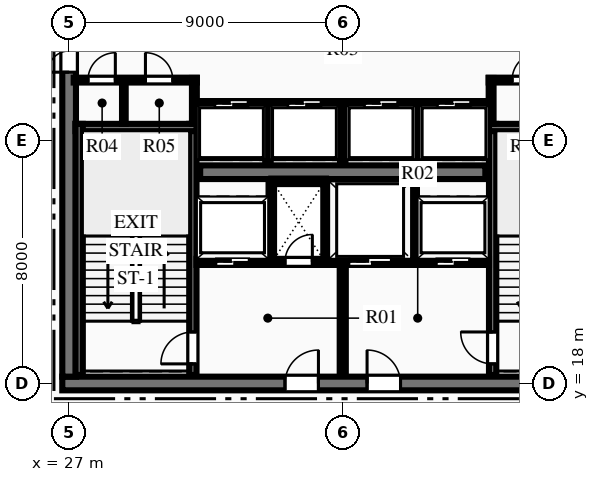
"""IFC4 building model, lengths in metres.
Left out: names, types, materials, properties, quantities, classifications, styles, units other than length and angle.
Written with IfcOpenShell. Run it as: python <this file> out.ifc"""

import sys

from ifc_helpers import new_model, si_unit, direction, frame, frame_2d, origin, place, context, subcontext, project, spatial, rectangle, extrude, element, fill, save


model = new_model("IFC4")
c1 = context("Model", 3, precision=1e-05, world=origin(), true_north=direction((0.0, 1.0)))
c2 = subcontext(c1, "Body", "Model", "MODEL_VIEW")
j1 = project(units=[si_unit("LENGTHUNIT", "METRE"), si_unit("PLANEANGLEUNIT", "RADIAN")], contexts=[c1])
p1 = place(None, origin())
s1 = spatial("IfcSite", under=j1, at=p1, CompositionType="ELEMENT")
p2 = place(p1, origin())
s2 = spatial("IfcBuilding", under=s1, at=p2, CompositionType="ELEMENT")
p3 = place(p2, frame((0.0, 0.0, 317.7)))
s3 = spatial("IfcBuildingStorey", under=s2, at=p3, CompositionType="ELEMENT", Elevation=317.7)
p4 = place(p3, frame((26.775, 18.0, 0.0), z_axis=(0.0, 0.0, 1.0), x_axis=(1.0, 0.0, 0.0)))
e1 = element("IfcWall", 1, at=p4, inside=s3, PredefinedType="SHEAR", context=c2, shape_type="SweptSolid", body=[
    extrude(rectangle(XDim=18.45, YDim=0.45, at=frame_2d((9.225, 0.0))), origin(), (0.0, 0.0, 1.0), 3.75),
])
p5 = place(p4, frame((7.325, 0.0, 0.0)))
e2 = element("IfcOpeningElement", 2, at=p5, cuts=e1, PredefinedType="OPENING", context=c2, shape_type="SweptSolid", body=[
    extrude(rectangle(XDim=1.1, YDim=2.15, at=frame_2d((0.55, 1.075))), frame((0.0, 0.235, 0.0), z_axis=(0.0, -1.0, 0.0), x_axis=(1.0, 0.0, 0.0)), (0.0, 0.0, 1.0), 0.47),
])
p6 = place(p4, frame((10.025, 0.0, 0.0)))
e3 = element("IfcOpeningElement", 3, at=p6, cuts=e1, PredefinedType="OPENING", context=c2, shape_type="SweptSolid", body=[
    extrude(rectangle(XDim=1.1, YDim=2.15, at=frame_2d((0.55, 1.075))), frame((0.0, 0.235, 0.0), z_axis=(0.0, -1.0, 0.0), x_axis=(1.0, 0.0, 0.0)), (0.0, 0.0, 1.0), 0.47),
])
p7 = place(p3, frame((27.0, 18.225, 0.0), z_axis=(0.0, 0.0, 1.0), x_axis=(0.0, 1.0, 0.0)))
e4 = element("IfcWall", 4, at=p7, inside=s3, PredefinedType="SHEAR", context=c2, shape_type="SweptSolid", body=[
    extrude(rectangle(XDim=15.55, YDim=0.45, at=frame_2d((7.775, 0.0))), origin(), (0.0, 0.0, 1.0), 3.75),
])
p8 = place(p7, frame((10.015, 0.0, 0.0)))
e5 = element("IfcOpeningElement", 5, at=p8, cuts=e4, PredefinedType="OPENING", context=c2, shape_type="SweptSolid", body=[
    extrude(rectangle(XDim=1.4, YDim=2.2, at=frame_2d((0.7, 1.1))), frame((0.0, 0.235, 0.0), z_axis=(0.0, -1.0, 0.0), x_axis=(1.0, 0.0, 0.0)), (0.0, 0.0, 1.0), 0.47),
])
p9 = place(p3, frame((31.31, 24.95, 0.0), z_axis=(0.0, 0.0, 1.0), x_axis=(1.0, 0.0, 0.0)))
e6 = element("IfcWall", 6, at=p9, inside=s3, PredefinedType="SHEAR", context=c2, shape_type="SweptSolid", body=[
    extrude(rectangle(XDim=9.38, YDim=0.45, at=frame_2d((4.69, 0.0))), origin(), (0.0, 0.0, 1.0), 3.75),
])
p10 = place(p3, frame((31.07, 18.28, 0.0), z_axis=(0.0, 0.0, 1.0), x_axis=(0.0, 1.0, 0.0)))
e7 = element("IfcWall", 7, at=p10, inside=s3, PredefinedType="SHEAR", context=c2, shape_type="SweptSolid", body=[
    extrude(rectangle(XDim=8.26, YDim=0.24, at=frame_2d((4.13, 0.0))), origin(), (0.0, 0.0, 1.0), 3.75),
])
p11 = place(p10, frame((0.365, 0.0, 0.0)))
e8 = element("IfcOpeningElement", 8, at=p11, cuts=e7, PredefinedType="OPENING", context=c2, shape_type="SweptSolid", body=[
    extrude(rectangle(XDim=1.05, YDim=2.15, at=frame_2d((0.525, 1.075))), frame((0.0, 0.13, 0.0), z_axis=(0.0, -1.0, 0.0), x_axis=(1.0, 0.0, 0.0)), (0.0, 0.0, 1.0), 0.26),
])
p12 = place(p3, frame((27.21, 26.42, 0.0), z_axis=(0.0, 0.0, 1.0), x_axis=(1.0, 0.0, 0.0)))
e9 = element("IfcWall", 9, at=p12, inside=s3, PredefinedType="SHEAR", context=c2, shape_type="SweptSolid", body=[
    extrude(rectangle(XDim=3.98, YDim=0.24, at=frame_2d((1.99, 0.0))), origin(), (0.0, 0.0, 1.0), 3.75),
])
p13 = place(p3, frame((27.33, 18.28, 0.0), z_axis=(0.0, 0.0, 1.0), x_axis=(0.0, 1.0, 0.0)))
e10 = element("IfcWall", 10, at=p13, inside=s3, PredefinedType="SHEAR", context=c2, shape_type="SweptSolid", body=[
    extrude(rectangle(XDim=8.26, YDim=0.24, at=frame_2d((4.13, 0.0))), origin(), (0.0, 0.0, 1.0), 3.75),
])
p14 = place(p3, frame((40.93, 18.28, 0.0), z_axis=(0.0, 0.0, 1.0), x_axis=(0.0, 1.0, 0.0)))
e11 = element("IfcWall", 11, at=p14, inside=s3, PredefinedType="SHEAR", context=c2, shape_type="SweptSolid", body=[
    extrude(rectangle(XDim=8.26, YDim=0.24, at=frame_2d((4.13, 0.0))), origin(), (0.0, 0.0, 1.0), 3.75),
])
p15 = place(p14, frame((0.365, 0.0, 0.0)))
e12 = element("IfcOpeningElement", 12, at=p15, cuts=e11, PredefinedType="OPENING", context=c2, shape_type="SweptSolid", body=[
    extrude(rectangle(XDim=1.05, YDim=2.15, at=frame_2d((0.525, 1.075))), frame((0.0, 0.13, 0.0), z_axis=(0.0, -1.0, 0.0), x_axis=(1.0, 0.0, 0.0)), (0.0, 0.0, 1.0), 0.26),
])
p16 = place(p3, frame((40.81, 26.42, 0.0), z_axis=(0.0, 0.0, 1.0), x_axis=(1.0, 0.0, 0.0)))
e13 = element("IfcWall", 13, at=p16, inside=s3, PredefinedType="SHEAR", context=c2, shape_type="SweptSolid", body=[
    extrude(rectangle(XDim=3.98, YDim=0.24, at=frame_2d((1.99, 0.0))), origin(), (0.0, 0.0, 1.0), 3.75),
])
p17 = place(p3, frame((36.0, 18.28, 0.0), z_axis=(0.0, 0.0, 1.0), x_axis=(0.0, 1.0, 0.0)))
e14 = element("IfcWall", 14, at=p17, inside=s3, PredefinedType="PARTITIONING", context=c2, shape_type="SweptSolid", body=[
    extrude(rectangle(XDim=3.77, YDim=0.2, at=frame_2d((1.885, 0.0))), origin(), (0.0, 0.0, 1.0), 3.49),
])
p18 = place(p3, frame((31.19, 22.0, 0.0), z_axis=(0.0, 0.0, 1.0), x_axis=(1.0, 0.0, 0.0)))
e15 = element("IfcWall", 15, at=p18, inside=s3, PredefinedType="PARTITIONING", context=c2, shape_type="SweptSolid", body=[
    extrude(rectangle(XDim=4.69, YDim=0.2, at=frame_2d((2.345, 0.0))), origin(), (0.0, 0.0, 1.0), 3.49),
])
p19 = place(p18, frame((2.91, 0.0, 0.0)))
e16 = element("IfcOpeningElement", 16, at=p19, cuts=e15, PredefinedType="OPENING", context=c2, shape_type="SweptSolid", body=[
    extrude(rectangle(XDim=0.9, YDim=2.15, at=frame_2d((0.45, 1.075))), frame((0.0, 0.11, 0.0), z_axis=(0.0, -1.0, 0.0), x_axis=(1.0, 0.0, 0.0)), (0.0, 0.0, 1.0), 0.22),
])
p20 = place(p18, frame((0.635, 0.0, 0.0)))
e17 = element("IfcOpeningElement", 17, at=p20, cuts=e15, PredefinedType="OPENING", context=c2, shape_type="SweptSolid", body=[
    extrude(rectangle(XDim=1.1, YDim=2.15, at=frame_2d((0.55, 1.075))), frame((0.0, 0.11, 0.0), z_axis=(0.0, -1.0, 0.0), x_axis=(1.0, 0.0, 0.0)), (0.0, 0.0, 1.0), 0.22),
])
p21 = place(p3, frame((36.12, 22.0, 0.0), z_axis=(0.0, 0.0, 1.0), x_axis=(1.0, 0.0, 0.0)))
e18 = element("IfcWall", 18, at=p21, inside=s3, PredefinedType="PARTITIONING", context=c2, shape_type="SweptSolid", body=[
    extrude(rectangle(XDim=4.69, YDim=0.2, at=frame_2d((2.345, 0.0))), origin(), (0.0, 0.0, 1.0), 3.49),
])
p22 = place(p21, frame((2.955, 0.0, 0.0)))
e19 = element("IfcOpeningElement", 19, at=p22, cuts=e18, PredefinedType="OPENING", context=c2, shape_type="SweptSolid", body=[
    extrude(rectangle(XDim=1.1, YDim=2.15, at=frame_2d((0.55, 1.075))), frame((0.0, 0.11, 0.0), z_axis=(0.0, -1.0, 0.0), x_axis=(1.0, 0.0, 0.0)), (0.0, 0.0, 1.0), 0.22),
])
p23 = place(p21, frame((0.08, 0.0, 0.0)))
e20 = element("IfcOpeningElement", 20, at=p23, cuts=e18, PredefinedType="OPENING", context=c2, shape_type="SweptSolid", body=[
    extrude(rectangle(XDim=1.4, YDim=2.2, at=frame_2d((0.7, 1.1))), frame((0.0, 0.11, 0.0), z_axis=(0.0, -1.0, 0.0), x_axis=(1.0, 0.0, 0.0)), (0.0, 0.0, 1.0), 0.22),
])
for number, where, z_axis, x_axis in (
    (21, (33.65, 22.05, 0.0), (0.0, 0.0, 1.0), (0.0, 1.0, 0.0)),
    (22, (35.45, 22.05, 0.0), (0.0, 0.0, 1.0), (0.0, 1.0, 0.0)),
):
    element("IfcWall", number, at=place(p3, frame(where, z_axis=z_axis, x_axis=x_axis)), inside=s3, PredefinedType="PARTITIONING", context=c2, shape_type="SweptSolid", body=[
        extrude(rectangle(XDim=2.6, YDim=0.18, at=frame_2d((1.3, 0.0))), origin(), (0.0, 0.0, 1.0), 3.49),
    ])
p24 = place(p3, frame((33.65, 24.65, 0.0), z_axis=(0.0, 0.0, 1.0), x_axis=(1.0, 0.0, 0.0)))
e23 = element("IfcWall", 23, at=p24, inside=s3, PredefinedType="PARTITIONING", context=c2, shape_type="SweptSolid", body=[
    extrude(rectangle(XDim=1.8, YDim=0.18, at=frame_2d((0.9, 0.0))), origin(), (0.0, 0.0, 1.0), 3.49),
])
p25 = place(p3, frame((38.35, 22.05, 0.0), z_axis=(0.0, 0.0, 1.0), x_axis=(0.0, 1.0, 0.0)))
e24 = element("IfcWall", 24, at=p25, inside=s3, PredefinedType="PARTITIONING", context=c2, shape_type="SweptSolid", body=[
    extrude(rectangle(XDim=2.6, YDim=0.18, at=frame_2d((1.3, 0.0))), origin(), (0.0, 0.0, 1.0), 3.49),
])
p26 = place(p3, frame((27.15, 27.98, 0.0), z_axis=(0.0, 0.0, 1.0), x_axis=(1.0, 0.0, 0.0)))
e25 = element("IfcWall", 25, at=p26, inside=s3, PredefinedType="PARTITIONING", context=c2, shape_type="SweptSolid", body=[
    extrude(rectangle(XDim=4.05, YDim=0.16, at=frame_2d((2.025, 0.0))), origin(), (0.0, 0.0, 1.0), 3.49),
])
p27 = place(p26, frame((0.47, 0.0, 0.0)))
e26 = element("IfcOpeningElement", 26, at=p27, cuts=e25, PredefinedType="OPENING", context=c2, shape_type="SweptSolid", body=[
    extrude(rectangle(XDim=0.9, YDim=2.15, at=frame_2d((0.45, 1.075))), frame((0.0, 0.09, 0.0), z_axis=(0.0, -1.0, 0.0), x_axis=(1.0, 0.0, 0.0)), (0.0, 0.0, 1.0), 0.18),
])
p28 = place(p26, frame((2.36, 0.0, 0.0)))
e27 = element("IfcOpeningElement", 27, at=p28, cuts=e25, PredefinedType="OPENING", context=c2, shape_type="SweptSolid", body=[
    extrude(rectangle(XDim=0.9, YDim=2.15, at=frame_2d((0.45, 1.075))), frame((0.0, 0.09, 0.0), z_axis=(0.0, -1.0, 0.0), x_axis=(1.0, 0.0, 0.0)), (0.0, 0.0, 1.0), 0.18),
])
p29 = place(p3, frame((31.12, 26.54, 0.0), z_axis=(0.0, 0.0, 1.0), x_axis=(0.0, 1.0, 0.0)))
e28 = element("IfcWall", 28, at=p29, inside=s3, PredefinedType="PARTITIONING", context=c2, shape_type="SweptSolid", body=[
    extrude(rectangle(XDim=1.51, YDim=0.16, at=frame_2d((0.755, 0.0))), origin(), (0.0, 0.0, 1.0), 3.49),
])
p30 = place(p3, frame((40.8, 27.98, 0.0), z_axis=(0.0, 0.0, 1.0), x_axis=(1.0, 0.0, 0.0)))
e29 = element("IfcWall", 29, at=p30, inside=s3, PredefinedType="PARTITIONING", context=c2, shape_type="SweptSolid", body=[
    extrude(rectangle(XDim=4.05, YDim=0.16, at=frame_2d((2.025, 0.0))), origin(), (0.0, 0.0, 1.0), 3.49),
])
p31 = place(p30, frame((0.77, 0.0, 0.0)))
e30 = element("IfcOpeningElement", 30, at=p31, cuts=e29, PredefinedType="OPENING", context=c2, shape_type="SweptSolid", body=[
    extrude(rectangle(XDim=0.9, YDim=2.15, at=frame_2d((0.45, 1.075))), frame((0.0, 0.09, 0.0), z_axis=(0.0, -1.0, 0.0), x_axis=(1.0, 0.0, 0.0)), (0.0, 0.0, 1.0), 0.18),
])
p32 = place(p30, frame((2.68, 0.0, 0.0)))
e31 = element("IfcOpeningElement", 31, at=p32, cuts=e29, PredefinedType="OPENING", context=c2, shape_type="SweptSolid", body=[
    extrude(rectangle(XDim=0.9, YDim=2.15, at=frame_2d((0.45, 1.075))), frame((0.0, 0.09, 0.0), z_axis=(0.0, -1.0, 0.0), x_axis=(1.0, 0.0, 0.0)), (0.0, 0.0, 1.0), 0.18),
])
p33 = place(p3, frame((40.88, 26.54, 0.0), z_axis=(0.0, 0.0, 1.0), x_axis=(0.0, 1.0, 0.0)))
e32 = element("IfcWall", 32, at=p33, inside=s3, PredefinedType="PARTITIONING", context=c2, shape_type="SweptSolid", body=[
    extrude(rectangle(XDim=1.51, YDim=0.16, at=frame_2d((0.755, 0.0))), origin(), (0.0, 0.0, 1.0), 3.49),
])
p34 = place(p3, frame((28.8, 26.54, 0.0), z_axis=(0.0, 0.0, 1.0), x_axis=(0.0, 1.0, 0.0)))
e33 = element("IfcWall", 33, at=p34, inside=s3, PredefinedType="PARTITIONING", context=c2, shape_type="SweptSolid", body=[
    extrude(rectangle(XDim=1.44, YDim=0.12, at=frame_2d((0.72, 0.0))), origin(), (0.0, 0.0, 1.0), 3.49),
])
p35 = place(p3, frame((31.2, 27.2, 0.0), z_axis=(0.0, 0.0, 1.0), x_axis=(1.0, 0.0, 0.0)))
e34 = element("IfcWall", 34, at=p35, inside=s3, PredefinedType="PARTITIONING", context=c2, shape_type="SweptSolid", body=[
    extrude(rectangle(XDim=9.6, YDim=0.18, at=frame_2d((4.8, 0.0))), origin(), (0.0, 0.0, 1.0), 3.49),
])
p36 = place(p35, frame((0.59, 0.0, 0.0)))
e35 = element("IfcOpeningElement", 35, at=p36, cuts=e34, PredefinedType="OPENING", context=c2, shape_type="SweptSolid", body=[
    extrude(rectangle(XDim=1.1, YDim=2.15, at=frame_2d((0.55, 1.075))), frame((0.0, 0.1, 0.0), z_axis=(0.0, -1.0, 0.0), x_axis=(1.0, 0.0, 0.0)), (0.0, 0.0, 1.0), 0.2),
])
p37 = place(p35, frame((2.99, 0.0, 0.0)))
e36 = element("IfcOpeningElement", 36, at=p37, cuts=e34, PredefinedType="OPENING", context=c2, shape_type="SweptSolid", body=[
    extrude(rectangle(XDim=1.1, YDim=2.15, at=frame_2d((0.55, 1.075))), frame((0.0, 0.1, 0.0), z_axis=(0.0, -1.0, 0.0), x_axis=(1.0, 0.0, 0.0)), (0.0, 0.0, 1.0), 0.2),
])
p38 = place(p35, frame((5.51, 0.0, 0.0)))
e37 = element("IfcOpeningElement", 37, at=p38, cuts=e34, PredefinedType="OPENING", context=c2, shape_type="SweptSolid", body=[
    extrude(rectangle(XDim=1.1, YDim=2.15, at=frame_2d((0.55, 1.075))), frame((0.0, 0.1, 0.0), z_axis=(0.0, -1.0, 0.0), x_axis=(1.0, 0.0, 0.0)), (0.0, 0.0, 1.0), 0.2),
])
p39 = place(p35, frame((7.91, 0.0, 0.0)))
e38 = element("IfcOpeningElement", 38, at=p39, cuts=e34, PredefinedType="OPENING", context=c2, shape_type="SweptSolid", body=[
    extrude(rectangle(XDim=1.1, YDim=2.15, at=frame_2d((0.55, 1.075))), frame((0.0, 0.1, 0.0), z_axis=(0.0, -1.0, 0.0), x_axis=(1.0, 0.0, 0.0)), (0.0, 0.0, 1.0), 0.2),
])
for number, where, z_axis, x_axis in (
    (39, (33.54, 25.3, 0.0), (0.0, 0.0, 1.0), (0.0, 1.0, 0.0)),
    (40, (36.0, 25.3, 0.0), (0.0, 0.0, 1.0), (0.0, 1.0, 0.0)),
    (41, (38.46, 25.3, 0.0), (0.0, 0.0, 1.0), (0.0, 1.0, 0.0)),
):
    element("IfcWall", number, at=place(p3, frame(where, z_axis=z_axis, x_axis=x_axis)), inside=s3, PredefinedType="PARTITIONING", context=c2, shape_type="SweptSolid", body=[
        extrude(rectangle(XDim=1.9, YDim=0.18, at=frame_2d((0.95, 0.0))), origin(), (0.0, 0.0, 1.0), 3.49),
    ])
p40 = place(p27, origin())
e42 = element("IfcDoor", 42, at=p40, inside=s3, OperationType="SINGLE_SWING_RIGHT", PredefinedType="DOOR", context=c2, shape_type="SweptSolid", body=[
    extrude(rectangle(XDim=0.9, YDim=2.15, at=frame_2d((0.45, 1.075))), frame((0.0, 0.025, 0.0), z_axis=(0.0, -1.0, 0.0), x_axis=(1.0, 0.0, 0.0)), (0.0, 0.0, 1.0), 0.05),
])
fill(e26, e42)
p41 = place(p28, origin())
e43 = element("IfcDoor", 43, at=p41, inside=s3, OperationType="SINGLE_SWING_LEFT", PredefinedType="DOOR", context=c2, shape_type="SweptSolid", body=[
    extrude(rectangle(XDim=0.9, YDim=2.15, at=frame_2d((0.45, 1.075))), frame((0.0, 0.025, 0.0), z_axis=(0.0, -1.0, 0.0), x_axis=(1.0, 0.0, 0.0)), (0.0, 0.0, 1.0), 0.05),
])
fill(e27, e43)
p42 = place(p31, origin())
e44 = element("IfcDoor", 44, at=p42, inside=s3, OperationType="SINGLE_SWING_RIGHT", PredefinedType="DOOR", context=c2, shape_type="SweptSolid", body=[
    extrude(rectangle(XDim=0.9, YDim=2.15, at=frame_2d((0.45, 1.075))), frame((0.0, 0.025, 0.0), z_axis=(0.0, -1.0, 0.0), x_axis=(1.0, 0.0, 0.0)), (0.0, 0.0, 1.0), 0.05),
])
fill(e30, e44)
p43 = place(p11, origin())
e45 = element("IfcDoor", 45, at=p43, inside=s3, OperationType="SINGLE_SWING_LEFT", PredefinedType="DOOR", context=c2, shape_type="SweptSolid", body=[
    extrude(rectangle(XDim=1.05, YDim=2.15, at=frame_2d((0.525, 1.075))), frame((0.0, 0.025, 0.0), z_axis=(0.0, -1.0, 0.0), x_axis=(1.0, 0.0, 0.0)), (0.0, 0.0, 1.0), 0.05),
])
fill(e8, e45)
p44 = place(p15, origin())
e46 = element("IfcDoor", 46, at=p44, inside=s3, OperationType="SINGLE_SWING_RIGHT", PredefinedType="DOOR", context=c2, shape_type="SweptSolid", body=[
    extrude(rectangle(XDim=1.05, YDim=2.15, at=frame_2d((0.525, 1.075))), frame((0.0, 0.025, 0.0), z_axis=(0.0, -1.0, 0.0), x_axis=(1.0, 0.0, 0.0)), (0.0, 0.0, 1.0), 0.05),
])
fill(e12, e46)
p45 = place(p5, origin())
e47 = element("IfcDoor", 47, at=p45, inside=s3, OperationType="SINGLE_SWING_RIGHT", PredefinedType="DOOR", context=c2, shape_type="SweptSolid", body=[
    extrude(rectangle(XDim=1.1, YDim=2.15, at=frame_2d((0.55, 1.075))), frame((0.0, 0.025, 0.0), z_axis=(0.0, -1.0, 0.0), x_axis=(1.0, 0.0, 0.0)), (0.0, 0.0, 1.0), 0.05),
])
fill(e2, e47)
p46 = place(p6, origin())
e48 = element("IfcDoor", 48, at=p46, inside=s3, OperationType="SINGLE_SWING_LEFT", PredefinedType="DOOR", context=c2, shape_type="SweptSolid", body=[
    extrude(rectangle(XDim=1.1, YDim=2.15, at=frame_2d((0.55, 1.075))), frame((0.0, 0.025, 0.0), z_axis=(0.0, -1.0, 0.0), x_axis=(1.0, 0.0, 0.0)), (0.0, 0.0, 1.0), 0.05),
])
fill(e3, e48)
p47 = place(p19, origin())
e49 = element("IfcDoor", 49, at=p47, inside=s3, OperationType="SINGLE_SWING_RIGHT", PredefinedType="DOOR", context=c2, shape_type="SweptSolid", body=[
    extrude(rectangle(XDim=0.9, YDim=2.15, at=frame_2d((0.45, 1.075))), frame((0.0, 0.025, 0.0), z_axis=(0.0, -1.0, 0.0), x_axis=(1.0, 0.0, 0.0)), (0.0, 0.0, 1.0), 0.05),
])
fill(e16, e49)
p48 = place(p8, origin())
e50 = element("IfcDoor", 50, at=p48, inside=s3, OperationType="DOUBLE_DOOR_SINGLE_SWING", PredefinedType="DOOR", context=c2, shape_type="SweptSolid", body=[
    extrude(rectangle(XDim=1.4, YDim=2.2, at=frame_2d((0.7, 1.1))), frame((0.0, 0.025, 0.0), z_axis=(0.0, -1.0, 0.0), x_axis=(1.0, 0.0, 0.0)), (0.0, 0.0, 1.0), 0.05),
])
fill(e5, e50)
p49 = place(p36, origin())
e51 = element("IfcDoor", 51, at=p49, inside=s3, OperationType="SLIDING_TO_LEFT", PredefinedType="DOOR", context=c2, shape_type="SweptSolid", body=[
    extrude(rectangle(XDim=1.1, YDim=2.15, at=frame_2d((0.55, 1.075))), frame((0.0, 0.025, 0.0), z_axis=(0.0, -1.0, 0.0), x_axis=(1.0, 0.0, 0.0)), (0.0, 0.0, 1.0), 0.05),
])
fill(e35, e51)
p50 = place(p37, origin())
e52 = element("IfcDoor", 52, at=p50, inside=s3, OperationType="SLIDING_TO_LEFT", PredefinedType="DOOR", context=c2, shape_type="SweptSolid", body=[
    extrude(rectangle(XDim=1.1, YDim=2.15, at=frame_2d((0.55, 1.075))), frame((0.0, 0.025, 0.0), z_axis=(0.0, -1.0, 0.0), x_axis=(1.0, 0.0, 0.0)), (0.0, 0.0, 1.0), 0.05),
])
fill(e36, e52)
p51 = place(p38, origin())
e53 = element("IfcDoor", 53, at=p51, inside=s3, OperationType="SLIDING_TO_LEFT", PredefinedType="DOOR", context=c2, shape_type="SweptSolid", body=[
    extrude(rectangle(XDim=1.1, YDim=2.15, at=frame_2d((0.55, 1.075))), frame((0.0, 0.025, 0.0), z_axis=(0.0, -1.0, 0.0), x_axis=(1.0, 0.0, 0.0)), (0.0, 0.0, 1.0), 0.05),
])
fill(e37, e53)
p52 = place(p39, origin())
e54 = element("IfcDoor", 54, at=p52, inside=s3, OperationType="SLIDING_TO_LEFT", PredefinedType="DOOR", context=c2, shape_type="SweptSolid", body=[
    extrude(rectangle(XDim=1.1, YDim=2.15, at=frame_2d((0.55, 1.075))), frame((0.0, 0.025, 0.0), z_axis=(0.0, -1.0, 0.0), x_axis=(1.0, 0.0, 0.0)), (0.0, 0.0, 1.0), 0.05),
])
fill(e38, e54)
p53 = place(p20, origin())
e55 = element("IfcDoor", 55, at=p53, inside=s3, OperationType="SLIDING_TO_LEFT", PredefinedType="DOOR", context=c2, shape_type="SweptSolid", body=[
    extrude(rectangle(XDim=1.1, YDim=2.15, at=frame_2d((0.55, 1.075))), frame((0.0, 0.025, 0.0), z_axis=(0.0, -1.0, 0.0), x_axis=(1.0, 0.0, 0.0)), (0.0, 0.0, 1.0), 0.05),
])
fill(e17, e55)
p54 = place(p22, origin())
e56 = element("IfcDoor", 56, at=p54, inside=s3, OperationType="SLIDING_TO_LEFT", PredefinedType="DOOR", context=c2, shape_type="SweptSolid", body=[
    extrude(rectangle(XDim=1.1, YDim=2.15, at=frame_2d((0.55, 1.075))), frame((0.0, 0.025, 0.0), z_axis=(0.0, -1.0, 0.0), x_axis=(1.0, 0.0, 0.0)), (0.0, 0.0, 1.0), 0.05),
])
fill(e19, e56)
p55 = place(p23, origin())
e57 = element("IfcDoor", 57, at=p55, inside=s3, OperationType="SLIDING_TO_LEFT", PredefinedType="DOOR", context=c2, shape_type="SweptSolid", body=[
    extrude(rectangle(XDim=1.4, YDim=2.2, at=frame_2d((0.7, 1.1))), frame((0.0, 0.025, 0.0), z_axis=(0.0, -1.0, 0.0), x_axis=(1.0, 0.0, 0.0)), (0.0, 0.0, 1.0), 0.05),
])
fill(e20, e57)
save(model, sys.argv[1])
